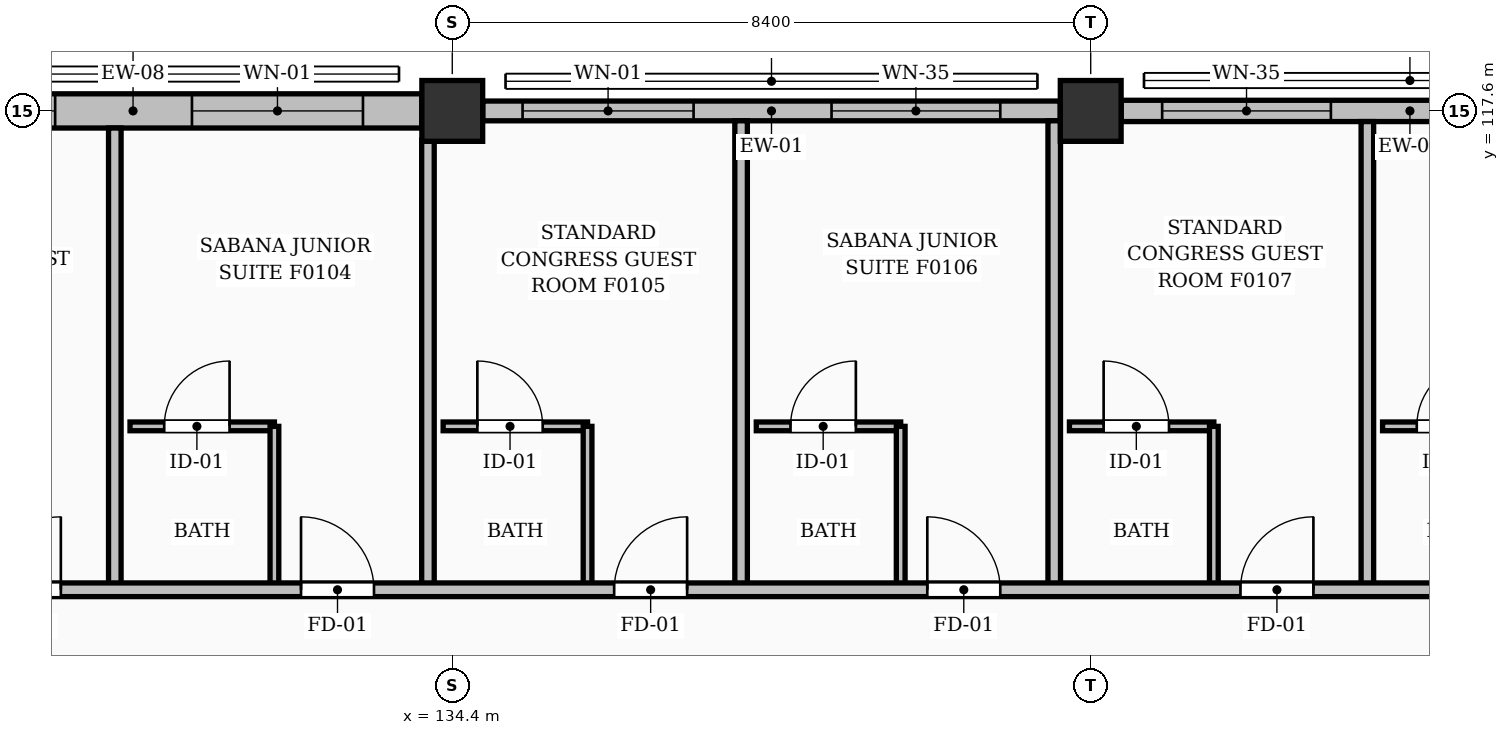
"""IFC4 building model, lengths in metres.
Left out: names, types, materials, properties, quantities, classifications, styles, units other than length and angle.
Written with IfcOpenShell. Run it as: python <this file> out.ifc"""

import sys

from ifc_helpers import new_model, si_unit, direction, frame, frame_2d, origin, origin_2d, place, context, subcontext, project, spatial, rectangle, extrude, element, fill, save


model = new_model("IFC4")
c1 = context("Model", 3, precision=1e-05, world=origin(), true_north=direction((0.0, 1.0)))
c2 = subcontext(c1, "Body", "Model", "MODEL_VIEW")
j1 = project(units=[si_unit("LENGTHUNIT", "METRE"), si_unit("PLANEANGLEUNIT", "RADIAN")], contexts=[c1])
p1 = place(None, origin())
s1 = spatial("IfcSite", under=j1, at=p1, CompositionType="ELEMENT")
p2 = place(p1, origin())
s2 = spatial("IfcBuilding", under=s1, at=p2, CompositionType="ELEMENT")
p3 = place(p2, frame((0.0, 0.0, 3.92)))
s3 = spatial("IfcBuildingStorey", under=s2, at=p3, CompositionType="ELEMENT", Elevation=3.92)
for number, where, z_axis, x_axis in (
    (1, (134.4, 117.6, 0.0), (0.0, 0.0, 1.0), (1.0, 0.0, 0.0)),
    (2, (142.8, 117.6, 0.0), (0.0, 0.0, 1.0), (1.0, 0.0, 0.0)),
):
    element("IfcColumn", number, at=place(p3, frame(where, z_axis=z_axis, x_axis=x_axis)), inside=s3, PredefinedType="COLUMN", context=c2, shape_type="SweptSolid", body=[
        extrude(rectangle(XDim=0.8, YDim=0.8, at=origin_2d()), origin(), (0.0, 0.0, 1.0), 3.64),
    ])
p4 = place(p3, frame((126.401, 117.6, 0.0), z_axis=(0.0, 0.0, 1.0), x_axis=(1.0, 0.0, 0.0)))
e3 = element("IfcWall", 3, at=p4, inside=s3, PredefinedType="SOLIDWALL", context=c2, shape_type="SweptSolid", body=[
    extrude(rectangle(XDim=7.598, YDim=0.45, at=frame_2d((3.799, 0.0))), origin(), (0.0, 0.0, 1.0), 2.445),
])
p5 = place(p4, frame((0.524, 0.0, 0.25)))
e4 = element("IfcOpeningElement", 4, at=p5, cuts=e3, PredefinedType="OPENING", context=c2, shape_type="SweptSolid", body=[
    extrude(rectangle(XDim=2.25, YDim=1.95, at=frame_2d((1.125, 0.975))), frame((0.0, 0.235, 0.0), z_axis=(0.0, -1.0, 0.0), x_axis=(1.0, 0.0, 0.0)), (0.0, 0.0, 1.0), 0.47),
])
p6 = place(p4, frame((4.574, 0.0, 0.25)))
e5 = element("IfcOpeningElement", 5, at=p6, cuts=e3, PredefinedType="OPENING", context=c2, shape_type="SweptSolid", body=[
    extrude(rectangle(XDim=2.25, YDim=1.85, at=frame_2d((1.125, 0.925))), frame((0.0, 0.235, 0.0), z_axis=(0.0, -1.0, 0.0), x_axis=(1.0, 0.0, 0.0)), (0.0, 0.0, 1.0), 0.47),
])
p7 = place(p3, frame((134.801, 117.6, 0.0), z_axis=(0.0, 0.0, 1.0), x_axis=(1.0, 0.0, 0.0)))
e6 = element("IfcWall", 6, at=p7, inside=s3, PredefinedType="SOLIDWALL", context=c2, shape_type="SweptSolid", body=[
    extrude(rectangle(XDim=7.598, YDim=0.26, at=frame_2d((3.799, 0.0))), origin(), (0.0, 0.0, 1.0), 2.445),
])
p8 = place(p7, frame((0.524, 0.0, 0.25)))
e7 = element("IfcOpeningElement", 7, at=p8, cuts=e6, PredefinedType="OPENING", context=c2, shape_type="SweptSolid", body=[
    extrude(rectangle(XDim=2.25, YDim=1.85, at=frame_2d((1.125, 0.925))), frame((0.0, 0.14, 0.0), z_axis=(0.0, -1.0, 0.0), x_axis=(1.0, 0.0, 0.0)), (0.0, 0.0, 1.0), 0.28),
])
p9 = place(p7, frame((4.589, 0.0, 0.25)))
e8 = element("IfcOpeningElement", 8, at=p9, cuts=e6, PredefinedType="OPENING", context=c2, shape_type="SweptSolid", body=[
    extrude(rectangle(XDim=2.22, YDim=1.9, at=frame_2d((1.11, 0.95))), frame((0.0, 0.14, 0.0), z_axis=(0.0, -1.0, 0.0), x_axis=(1.0, 0.0, 0.0)), (0.0, 0.0, 1.0), 0.28),
])
p10 = place(p3, frame((143.201, 117.6, 0.0), z_axis=(0.0, 0.0, 1.0), x_axis=(1.0, 0.0, 0.0)))
e9 = element("IfcWall", 9, at=p10, inside=s3, PredefinedType="SOLIDWALL", context=c2, shape_type="SweptSolid", body=[
    extrude(rectangle(XDim=7.598, YDim=0.28, at=frame_2d((3.799, 0.0))), origin(), (0.0, 0.0, 1.0), 2.445),
])
p11 = place(p10, frame((0.539, 0.0, 0.25)))
e10 = element("IfcOpeningElement", 10, at=p11, cuts=e9, PredefinedType="OPENING", context=c2, shape_type="SweptSolid", body=[
    extrude(rectangle(XDim=2.22, YDim=1.9, at=frame_2d((1.11, 0.95))), frame((0.0, 0.15, 0.0), z_axis=(0.0, -1.0, 0.0), x_axis=(1.0, 0.0, 0.0)), (0.0, 0.0, 1.0), 0.3),
])
p12 = place(p10, frame((4.574, 0.0, 0.25)))
e11 = element("IfcOpeningElement", 11, at=p12, cuts=e9, PredefinedType="OPENING", context=c2, shape_type="SweptSolid", body=[
    extrude(rectangle(XDim=2.25, YDim=1.95, at=frame_2d((1.125, 0.975))), frame((0.0, 0.15, 0.0), z_axis=(0.0, -1.0, 0.0), x_axis=(1.0, 0.0, 0.0)), (0.0, 0.0, 1.0), 0.3),
])
p13 = place(p3, frame((130.16, 113.45, 0.0), z_axis=(0.0, 0.0, 1.0), x_axis=(1.0, 0.0, 0.0)))
e12 = element("IfcWall", 12, at=p13, inside=s3, PredefinedType="PARTITIONING", context=c2, shape_type="SweptSolid", body=[
    extrude(rectangle(XDim=1.9, YDim=0.115, at=frame_2d((0.95, 0.0))), origin(), (0.0, 0.0, 1.0), 3.36),
])
p14 = place(p13, frame((0.45, 0.0, 0.0)))
e13 = element("IfcOpeningElement", 13, at=p14, cuts=e12, PredefinedType="OPENING", context=c2, shape_type="SweptSolid", body=[
    extrude(rectangle(XDim=0.86, YDim=2.05, at=frame_2d((0.43, 1.025))), frame((0.0, 0.067, 0.0), z_axis=(0.0, -1.0, 0.0), x_axis=(1.0, 0.0, 0.0)), (0.0, 0.0, 1.0), 0.135),
])
p15 = place(p3, frame((132.06, 111.3, 0.0), z_axis=(0.0, 0.0, 1.0), x_axis=(0.0, 1.0, 0.0)))
e14 = element("IfcWall", 14, at=p15, inside=s3, PredefinedType="PARTITIONING", context=c2, shape_type="SweptSolid", body=[
    extrude(rectangle(XDim=2.15, YDim=0.115, at=frame_2d((1.075, 0.0))), origin(), (0.0, 0.0, 1.0), 3.36),
])
p16 = place(p3, frame((129.96, 111.3, 0.0), z_axis=(0.0, 0.0, 1.0), x_axis=(0.0, 1.0, 0.0)))
e15 = element("IfcWall", 15, at=p16, inside=s3, PredefinedType="PARTITIONING", context=c2, shape_type="SweptSolid", body=[
    extrude(rectangle(XDim=6.075, YDim=0.165, at=frame_2d((3.038, 0.0))), origin(), (0.0, 0.0, 1.0), 3.36),
])
p17 = place(p3, frame((134.28, 113.45, 0.0), z_axis=(0.0, 0.0, 1.0), x_axis=(1.0, 0.0, 0.0)))
e16 = element("IfcWall", 16, at=p17, inside=s3, PredefinedType="PARTITIONING", context=c2, shape_type="SweptSolid", body=[
    extrude(rectangle(XDim=1.9, YDim=0.115, at=frame_2d((0.95, 0.0))), origin(), (0.0, 0.0, 1.0), 3.36),
])
p18 = place(p17, frame((0.45, 0.0, 0.0)))
e17 = element("IfcOpeningElement", 17, at=p18, cuts=e16, PredefinedType="OPENING", context=c2, shape_type="SweptSolid", body=[
    extrude(rectangle(XDim=0.86, YDim=2.05, at=frame_2d((0.43, 1.025))), frame((0.0, 0.067, 0.0), z_axis=(0.0, -1.0, 0.0), x_axis=(1.0, 0.0, 0.0)), (0.0, 0.0, 1.0), 0.135),
])
p19 = place(p3, frame((136.18, 111.3, 0.0), z_axis=(0.0, 0.0, 1.0), x_axis=(0.0, 1.0, 0.0)))
e18 = element("IfcWall", 18, at=p19, inside=s3, PredefinedType="PARTITIONING", context=c2, shape_type="SweptSolid", body=[
    extrude(rectangle(XDim=2.15, YDim=0.115, at=frame_2d((1.075, 0.0))), origin(), (0.0, 0.0, 1.0), 3.36),
])
p20 = place(p3, frame((134.08, 111.3, 0.0), z_axis=(0.0, 0.0, 1.0), x_axis=(0.0, 1.0, 0.0)))
e19 = element("IfcWall", 19, at=p20, inside=s3, PredefinedType="PARTITIONING", context=c2, shape_type="SweptSolid", body=[
    extrude(rectangle(XDim=5.92, YDim=0.165, at=frame_2d((2.96, 0.0))), origin(), (0.0, 0.0, 1.0), 3.36),
])
p21 = place(p3, frame((138.4, 113.45, 0.0), z_axis=(0.0, 0.0, 1.0), x_axis=(1.0, 0.0, 0.0)))
e20 = element("IfcWall", 20, at=p21, inside=s3, PredefinedType="PARTITIONING", context=c2, shape_type="SweptSolid", body=[
    extrude(rectangle(XDim=1.9, YDim=0.115, at=frame_2d((0.95, 0.0))), origin(), (0.0, 0.0, 1.0), 3.36),
])
p22 = place(p21, frame((0.45, 0.0, 0.0)))
e21 = element("IfcOpeningElement", 21, at=p22, cuts=e20, PredefinedType="OPENING", context=c2, shape_type="SweptSolid", body=[
    extrude(rectangle(XDim=0.86, YDim=2.05, at=frame_2d((0.43, 1.025))), frame((0.0, 0.067, 0.0), z_axis=(0.0, -1.0, 0.0), x_axis=(1.0, 0.0, 0.0)), (0.0, 0.0, 1.0), 0.135),
])
p23 = place(p3, frame((140.3, 111.3, 0.0), z_axis=(0.0, 0.0, 1.0), x_axis=(0.0, 1.0, 0.0)))
e22 = element("IfcWall", 22, at=p23, inside=s3, PredefinedType="PARTITIONING", context=c2, shape_type="SweptSolid", body=[
    extrude(rectangle(XDim=2.15, YDim=0.115, at=frame_2d((1.075, 0.0))), origin(), (0.0, 0.0, 1.0), 3.36),
])
p24 = place(p3, frame((138.2, 111.3, 0.0), z_axis=(0.0, 0.0, 1.0), x_axis=(0.0, 1.0, 0.0)))
e23 = element("IfcWall", 23, at=p24, inside=s3, PredefinedType="PARTITIONING", context=c2, shape_type="SweptSolid", body=[
    extrude(rectangle(XDim=6.17, YDim=0.165, at=frame_2d((3.085, 0.0))), origin(), (0.0, 0.0, 1.0), 3.36),
])
p25 = place(p3, frame((142.52, 113.45, 0.0), z_axis=(0.0, 0.0, 1.0), x_axis=(1.0, 0.0, 0.0)))
e24 = element("IfcWall", 24, at=p25, inside=s3, PredefinedType="PARTITIONING", context=c2, shape_type="SweptSolid", body=[
    extrude(rectangle(XDim=1.9, YDim=0.115, at=frame_2d((0.95, 0.0))), origin(), (0.0, 0.0, 1.0), 3.36),
])
p26 = place(p25, frame((0.45, 0.0, 0.0)))
e25 = element("IfcOpeningElement", 25, at=p26, cuts=e24, PredefinedType="OPENING", context=c2, shape_type="SweptSolid", body=[
    extrude(rectangle(XDim=0.86, YDim=2.05, at=frame_2d((0.43, 1.025))), frame((0.0, 0.067, 0.0), z_axis=(0.0, -1.0, 0.0), x_axis=(1.0, 0.0, 0.0)), (0.0, 0.0, 1.0), 0.135),
])
p27 = place(p3, frame((144.42, 111.3, 0.0), z_axis=(0.0, 0.0, 1.0), x_axis=(0.0, 1.0, 0.0)))
e26 = element("IfcWall", 26, at=p27, inside=s3, PredefinedType="PARTITIONING", context=c2, shape_type="SweptSolid", body=[
    extrude(rectangle(XDim=2.15, YDim=0.115, at=frame_2d((1.075, 0.0))), origin(), (0.0, 0.0, 1.0), 3.36),
])
p28 = place(p3, frame((142.32, 111.3, 0.0), z_axis=(0.0, 0.0, 1.0), x_axis=(0.0, 1.0, 0.0)))
e27 = element("IfcWall", 27, at=p28, inside=s3, PredefinedType="PARTITIONING", context=c2, shape_type="SweptSolid", body=[
    extrude(rectangle(XDim=6.17, YDim=0.165, at=frame_2d((3.085, 0.0))), origin(), (0.0, 0.0, 1.0), 3.36),
])
p29 = place(p3, frame((146.64, 113.45, 0.0), z_axis=(0.0, 0.0, 1.0), x_axis=(1.0, 0.0, 0.0)))
e28 = element("IfcWall", 28, at=p29, inside=s3, PredefinedType="PARTITIONING", context=c2, shape_type="SweptSolid", body=[
    extrude(rectangle(XDim=1.9, YDim=0.115, at=frame_2d((0.95, 0.0))), origin(), (0.0, 0.0, 1.0), 3.36),
])
p30 = place(p29, frame((0.45, 0.0, 0.0)))
e29 = element("IfcOpeningElement", 29, at=p30, cuts=e28, PredefinedType="OPENING", context=c2, shape_type="SweptSolid", body=[
    extrude(rectangle(XDim=0.86, YDim=2.05, at=frame_2d((0.43, 1.025))), frame((0.0, 0.067, 0.0), z_axis=(0.0, -1.0, 0.0), x_axis=(1.0, 0.0, 0.0)), (0.0, 0.0, 1.0), 0.135),
])
p31 = place(p3, frame((146.44, 111.3, 0.0), z_axis=(0.0, 0.0, 1.0), x_axis=(0.0, 1.0, 0.0)))
e30 = element("IfcWall", 30, at=p31, inside=s3, PredefinedType="PARTITIONING", context=c2, shape_type="SweptSolid", body=[
    extrude(rectangle(XDim=6.16, YDim=0.165, at=frame_2d((3.08, 0.0))), origin(), (0.0, 0.0, 1.0), 3.36),
])
p32 = place(p3, frame((117.6, 111.3, 0.0), z_axis=(0.0, 0.0, 1.0), x_axis=(1.0, 0.0, 0.0)))
e31 = element("IfcWall", 31, at=p32, inside=s3, PredefinedType="PARTITIONING", context=c2, shape_type="SweptSolid", body=[
    extrude(rectangle(XDim=50.32, YDim=0.18, at=frame_2d((25.16, 0.0))), origin(), (0.0, 0.0, 1.0), 3.36),
])
p33 = place(p32, frame((2.45, 0.0, 0.0)))
e32 = element("IfcOpeningElement", 32, at=p33, cuts=e31, PredefinedType="OPENING", context=c2, shape_type="SweptSolid", body=[
    extrude(rectangle(XDim=0.96, YDim=2.15, at=frame_2d((0.48, 1.075))), frame((0.0, 0.1, 0.0), z_axis=(0.0, -1.0, 0.0), x_axis=(1.0, 0.0, 0.0)), (0.0, 0.0, 1.0), 0.2),
])
p34 = place(p32, frame((6.57, 0.0, 0.0)))
e33 = element("IfcOpeningElement", 33, at=p34, cuts=e31, PredefinedType="OPENING", context=c2, shape_type="SweptSolid", body=[
    extrude(rectangle(XDim=0.96, YDim=2.15, at=frame_2d((0.48, 1.075))), frame((0.0, 0.1, 0.0), z_axis=(0.0, -1.0, 0.0), x_axis=(1.0, 0.0, 0.0)), (0.0, 0.0, 1.0), 0.2),
])
p35 = place(p32, frame((10.69, 0.0, 0.0)))
e34 = element("IfcOpeningElement", 34, at=p35, cuts=e31, PredefinedType="OPENING", context=c2, shape_type="SweptSolid", body=[
    extrude(rectangle(XDim=0.96, YDim=2.15, at=frame_2d((0.48, 1.075))), frame((0.0, 0.1, 0.0), z_axis=(0.0, -1.0, 0.0), x_axis=(1.0, 0.0, 0.0)), (0.0, 0.0, 1.0), 0.2),
])
p36 = place(p32, frame((14.81, 0.0, 0.0)))
e35 = element("IfcOpeningElement", 35, at=p36, cuts=e31, PredefinedType="OPENING", context=c2, shape_type="SweptSolid", body=[
    extrude(rectangle(XDim=0.96, YDim=2.15, at=frame_2d((0.48, 1.075))), frame((0.0, 0.1, 0.0), z_axis=(0.0, -1.0, 0.0), x_axis=(1.0, 0.0, 0.0)), (0.0, 0.0, 1.0), 0.2),
])
p37 = place(p32, frame((18.93, 0.0, 0.0)))
e36 = element("IfcOpeningElement", 36, at=p37, cuts=e31, PredefinedType="OPENING", context=c2, shape_type="SweptSolid", body=[
    extrude(rectangle(XDim=0.96, YDim=2.15, at=frame_2d((0.48, 1.075))), frame((0.0, 0.1, 0.0), z_axis=(0.0, -1.0, 0.0), x_axis=(1.0, 0.0, 0.0)), (0.0, 0.0, 1.0), 0.2),
])
p38 = place(p32, frame((23.05, 0.0, 0.0)))
e37 = element("IfcOpeningElement", 37, at=p38, cuts=e31, PredefinedType="OPENING", context=c2, shape_type="SweptSolid", body=[
    extrude(rectangle(XDim=0.96, YDim=2.15, at=frame_2d((0.48, 1.075))), frame((0.0, 0.1, 0.0), z_axis=(0.0, -1.0, 0.0), x_axis=(1.0, 0.0, 0.0)), (0.0, 0.0, 1.0), 0.2),
])
p39 = place(p32, frame((27.17, 0.0, 0.0)))
e38 = element("IfcOpeningElement", 38, at=p39, cuts=e31, PredefinedType="OPENING", context=c2, shape_type="SweptSolid", body=[
    extrude(rectangle(XDim=0.96, YDim=2.15, at=frame_2d((0.48, 1.075))), frame((0.0, 0.1, 0.0), z_axis=(0.0, -1.0, 0.0), x_axis=(1.0, 0.0, 0.0)), (0.0, 0.0, 1.0), 0.2),
])
p40 = place(p32, frame((31.29, 0.0, 0.0)))
e39 = element("IfcOpeningElement", 39, at=p40, cuts=e31, PredefinedType="OPENING", context=c2, shape_type="SweptSolid", body=[
    extrude(rectangle(XDim=0.96, YDim=2.15, at=frame_2d((0.48, 1.075))), frame((0.0, 0.1, 0.0), z_axis=(0.0, -1.0, 0.0), x_axis=(1.0, 0.0, 0.0)), (0.0, 0.0, 1.0), 0.2),
])
p41 = place(p32, frame((35.41, 0.0, 0.0)))
e40 = element("IfcOpeningElement", 40, at=p41, cuts=e31, PredefinedType="OPENING", context=c2, shape_type="SweptSolid", body=[
    extrude(rectangle(XDim=0.96, YDim=2.15, at=frame_2d((0.48, 1.075))), frame((0.0, 0.1, 0.0), z_axis=(0.0, -1.0, 0.0), x_axis=(1.0, 0.0, 0.0)), (0.0, 0.0, 1.0), 0.2),
])
p42 = place(p32, frame((39.53, 0.0, 0.0)))
e41 = element("IfcOpeningElement", 41, at=p42, cuts=e31, PredefinedType="OPENING", context=c2, shape_type="SweptSolid", body=[
    extrude(rectangle(XDim=0.96, YDim=2.15, at=frame_2d((0.48, 1.075))), frame((0.0, 0.1, 0.0), z_axis=(0.0, -1.0, 0.0), x_axis=(1.0, 0.0, 0.0)), (0.0, 0.0, 1.0), 0.2),
])
p43 = place(p32, frame((43.65, 0.0, 0.0)))
e42 = element("IfcOpeningElement", 42, at=p43, cuts=e31, PredefinedType="OPENING", context=c2, shape_type="SweptSolid", body=[
    extrude(rectangle(XDim=0.96, YDim=2.15, at=frame_2d((0.48, 1.075))), frame((0.0, 0.1, 0.0), z_axis=(0.0, -1.0, 0.0), x_axis=(1.0, 0.0, 0.0)), (0.0, 0.0, 1.0), 0.2),
])
p44 = place(p32, frame((47.77, 0.0, 0.0)))
e43 = element("IfcOpeningElement", 43, at=p44, cuts=e31, PredefinedType="OPENING", context=c2, shape_type="SweptSolid", body=[
    extrude(rectangle(XDim=0.96, YDim=2.15, at=frame_2d((0.48, 1.075))), frame((0.0, 0.1, 0.0), z_axis=(0.0, -1.0, 0.0), x_axis=(1.0, 0.0, 0.0)), (0.0, 0.0, 1.0), 0.2),
])
p45 = place(p5, origin())
e44 = element("IfcWindow", 44, at=p45, inside=s3, PartitioningType="DOUBLE_PANEL_VERTICAL", PredefinedType="WINDOW", context=c2, shape_type="SweptSolid", body=[
    extrude(rectangle(XDim=2.25, YDim=1.95, at=frame_2d((1.125, 0.975))), frame((0.0, 0.03, 0.0), z_axis=(0.0, -1.0, 0.0), x_axis=(1.0, 0.0, 0.0)), (0.0, 0.0, 1.0), 0.06),
])
fill(e4, e44)
p46 = place(p6, origin())
e45 = element("IfcWindow", 45, at=p46, inside=s3, PartitioningType="DOUBLE_PANEL_VERTICAL", PredefinedType="WINDOW", context=c2, shape_type="SweptSolid", body=[
    extrude(rectangle(XDim=2.25, YDim=1.85, at=frame_2d((1.125, 0.925))), frame((0.0, 0.03, 0.0), z_axis=(0.0, -1.0, 0.0), x_axis=(1.0, 0.0, 0.0)), (0.0, 0.0, 1.0), 0.06),
])
fill(e5, e45)
p47 = place(p8, origin())
e46 = element("IfcWindow", 46, at=p47, inside=s3, PartitioningType="DOUBLE_PANEL_VERTICAL", PredefinedType="WINDOW", context=c2, shape_type="SweptSolid", body=[
    extrude(rectangle(XDim=2.25, YDim=1.85, at=frame_2d((1.125, 0.925))), frame((0.0, 0.03, 0.0), z_axis=(0.0, -1.0, 0.0), x_axis=(1.0, 0.0, 0.0)), (0.0, 0.0, 1.0), 0.06),
])
fill(e7, e46)
p48 = place(p9, origin())
e47 = element("IfcWindow", 47, at=p48, inside=s3, PartitioningType="DOUBLE_PANEL_VERTICAL", PredefinedType="WINDOW", context=c2, shape_type="SweptSolid", body=[
    extrude(rectangle(XDim=2.22, YDim=1.9, at=frame_2d((1.11, 0.95))), frame((0.0, 0.03, 0.0), z_axis=(0.0, -1.0, 0.0), x_axis=(1.0, 0.0, 0.0)), (0.0, 0.0, 1.0), 0.06),
])
fill(e8, e47)
p49 = place(p11, origin())
e48 = element("IfcWindow", 48, at=p49, inside=s3, PartitioningType="DOUBLE_PANEL_VERTICAL", PredefinedType="WINDOW", context=c2, shape_type="SweptSolid", body=[
    extrude(rectangle(XDim=2.22, YDim=1.9, at=frame_2d((1.11, 0.95))), frame((0.0, 0.03, 0.0), z_axis=(0.0, -1.0, 0.0), x_axis=(1.0, 0.0, 0.0)), (0.0, 0.0, 1.0), 0.06),
])
fill(e10, e48)
p50 = place(p14, origin())
e49 = element("IfcDoor", 49, at=p50, inside=s3, OperationType="SINGLE_SWING_RIGHT", PredefinedType="DOOR", context=c2, shape_type="SweptSolid", body=[
    extrude(rectangle(XDim=0.86, YDim=2.05, at=frame_2d((0.43, 1.025))), frame((0.0, 0.025, 0.0), z_axis=(0.0, -1.0, 0.0), x_axis=(1.0, 0.0, 0.0)), (0.0, 0.0, 1.0), 0.05),
])
fill(e13, e49)
p51 = place(p18, origin())
e50 = element("IfcDoor", 50, at=p51, inside=s3, OperationType="SINGLE_SWING_LEFT", PredefinedType="DOOR", context=c2, shape_type="SweptSolid", body=[
    extrude(rectangle(XDim=0.86, YDim=2.05, at=frame_2d((0.43, 1.025))), frame((0.0, 0.025, 0.0), z_axis=(0.0, -1.0, 0.0), x_axis=(1.0, 0.0, 0.0)), (0.0, 0.0, 1.0), 0.05),
])
fill(e17, e50)
p52 = place(p22, origin())
e51 = element("IfcDoor", 51, at=p52, inside=s3, OperationType="SINGLE_SWING_RIGHT", PredefinedType="DOOR", context=c2, shape_type="SweptSolid", body=[
    extrude(rectangle(XDim=0.86, YDim=2.05, at=frame_2d((0.43, 1.025))), frame((0.0, 0.025, 0.0), z_axis=(0.0, -1.0, 0.0), x_axis=(1.0, 0.0, 0.0)), (0.0, 0.0, 1.0), 0.05),
])
fill(e21, e51)
p53 = place(p26, origin())
e52 = element("IfcDoor", 52, at=p53, inside=s3, OperationType="SINGLE_SWING_LEFT", PredefinedType="DOOR", context=c2, shape_type="SweptSolid", body=[
    extrude(rectangle(XDim=0.86, YDim=2.05, at=frame_2d((0.43, 1.025))), frame((0.0, 0.025, 0.0), z_axis=(0.0, -1.0, 0.0), x_axis=(1.0, 0.0, 0.0)), (0.0, 0.0, 1.0), 0.05),
])
fill(e25, e52)
p54 = place(p30, origin())
e53 = element("IfcDoor", 53, at=p54, inside=s3, OperationType="SINGLE_SWING_RIGHT", PredefinedType="DOOR", context=c2, shape_type="SweptSolid", body=[
    extrude(rectangle(XDim=0.86, YDim=2.05, at=frame_2d((0.43, 1.025))), frame((0.0, 0.025, 0.0), z_axis=(0.0, -1.0, 0.0), x_axis=(1.0, 0.0, 0.0)), (0.0, 0.0, 1.0), 0.05),
])
fill(e29, e53)
p55 = place(p35, origin())
e54 = element("IfcDoor", 54, at=p55, inside=s3, OperationType="SINGLE_SWING_RIGHT", PredefinedType="DOOR", context=c2, shape_type="SweptSolid", body=[
    extrude(rectangle(XDim=0.96, YDim=2.15, at=frame_2d((0.48, 1.075))), frame((0.0, 0.025, 0.0), z_axis=(0.0, -1.0, 0.0), x_axis=(1.0, 0.0, 0.0)), (0.0, 0.0, 1.0), 0.05),
])
fill(e34, e54)
p56 = place(p36, origin())
e55 = element("IfcDoor", 55, at=p56, inside=s3, OperationType="SINGLE_SWING_LEFT", PredefinedType="DOOR", context=c2, shape_type="SweptSolid", body=[
    extrude(rectangle(XDim=0.96, YDim=2.15, at=frame_2d((0.48, 1.075))), frame((0.0, 0.025, 0.0), z_axis=(0.0, -1.0, 0.0), x_axis=(1.0, 0.0, 0.0)), (0.0, 0.0, 1.0), 0.05),
])
fill(e35, e55)
p57 = place(p37, origin())
e56 = element("IfcDoor", 56, at=p57, inside=s3, OperationType="SINGLE_SWING_RIGHT", PredefinedType="DOOR", context=c2, shape_type="SweptSolid", body=[
    extrude(rectangle(XDim=0.96, YDim=2.15, at=frame_2d((0.48, 1.075))), frame((0.0, 0.025, 0.0), z_axis=(0.0, -1.0, 0.0), x_axis=(1.0, 0.0, 0.0)), (0.0, 0.0, 1.0), 0.05),
])
fill(e36, e56)
p58 = place(p38, origin())
e57 = element("IfcDoor", 57, at=p58, inside=s3, OperationType="SINGLE_SWING_LEFT", PredefinedType="DOOR", context=c2, shape_type="SweptSolid", body=[
    extrude(rectangle(XDim=0.96, YDim=2.15, at=frame_2d((0.48, 1.075))), frame((0.0, 0.025, 0.0), z_axis=(0.0, -1.0, 0.0), x_axis=(1.0, 0.0, 0.0)), (0.0, 0.0, 1.0), 0.05),
])
fill(e37, e57)
p59 = place(p39, origin())
e58 = element("IfcDoor", 58, at=p59, inside=s3, OperationType="SINGLE_SWING_RIGHT", PredefinedType="DOOR", context=c2, shape_type="SweptSolid", body=[
    extrude(rectangle(XDim=0.96, YDim=2.15, at=frame_2d((0.48, 1.075))), frame((0.0, 0.025, 0.0), z_axis=(0.0, -1.0, 0.0), x_axis=(1.0, 0.0, 0.0)), (0.0, 0.0, 1.0), 0.05),
])
fill(e38, e58)
save(model, sys.argv[1])
